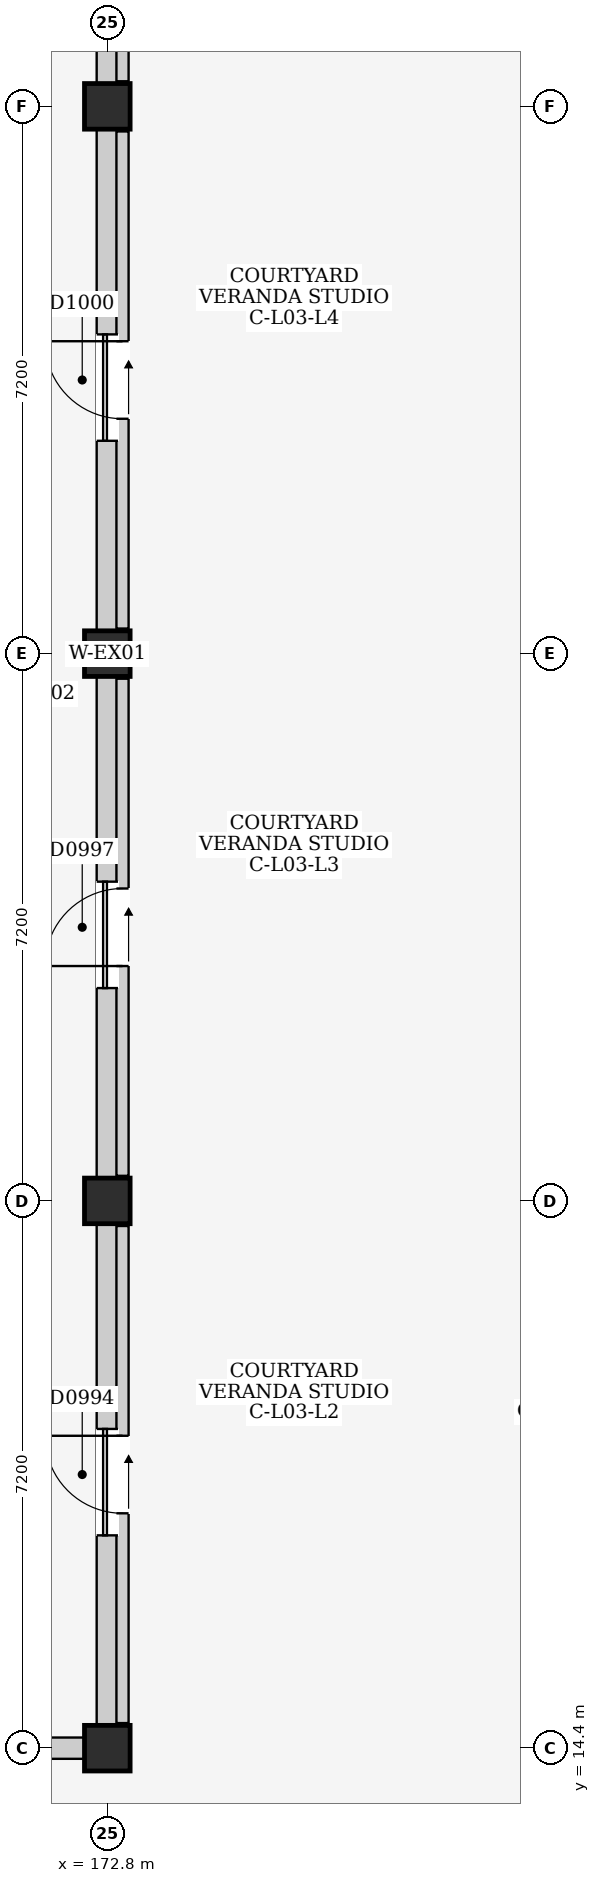
"""IFC4 building model, lengths in metres.
Left out: names, types, materials, properties, quantities, classifications, styles, units other than length and angle.
Written with IfcOpenShell. Run it as: python <this file> out.ifc"""

import sys

from ifc_helpers import new_model, si_unit, direction, frame, frame_2d, origin, origin_2d, place, context, subcontext, project, spatial, rectangle, extrude, element, fill, save


model = new_model("IFC4")
c1 = context("Model", 3, precision=1e-05, world=origin(), true_north=direction((0.0, 1.0)))
c2 = subcontext(c1, "Body", "Model", "MODEL_VIEW")
j1 = project(units=[si_unit("LENGTHUNIT", "METRE"), si_unit("PLANEANGLEUNIT", "RADIAN")], contexts=[c1])
p1 = place(None, origin())
s1 = spatial("IfcSite", under=j1, at=p1, CompositionType="ELEMENT")
p2 = place(p1, origin())
s2 = spatial("IfcBuilding", under=s1, at=p2, CompositionType="ELEMENT")
p3 = place(p2, frame((0.0, 0.0, 12.2)))
s3 = spatial("IfcBuildingStorey", under=s2, at=p3, CompositionType="ELEMENT", Elevation=12.2)
for number, where, z_axis, x_axis in (
    (1, (172.8, 14.4, 0.0), (0.0, 0.0, 1.0), (1.0, 0.0, 0.0)),
    (2, (172.8, 21.6, 0.0), (0.0, 0.0, 1.0), (1.0, 0.0, 0.0)),
    (3, (172.8, 28.8, 0.0), (0.0, 0.0, 1.0), (1.0, 0.0, 0.0)),
    (4, (172.8, 36.0, 0.0), (0.0, 0.0, 1.0), (1.0, 0.0, 0.0)),
):
    element("IfcColumn", number, at=place(p3, frame(where, z_axis=z_axis, x_axis=x_axis)), inside=s3, PredefinedType="COLUMN", context=c2, shape_type="SweptSolid", body=[
        extrude(rectangle(XDim=0.6, YDim=0.6, at=origin_2d()), origin(), (0.0, 0.0, 1.0), 3.2),
    ])
p4 = place(p3, frame((165.9, 14.4, 0.0), z_axis=(0.0, 0.0, 1.0), x_axis=(1.0, 0.0, 0.0)))
e5 = element("IfcWall", 5, at=p4, inside=s3, PredefinedType="ELEMENTEDWALL", context=c2, shape_type="SweptSolid", body=[
    extrude(rectangle(XDim=6.6, YDim=0.28, at=frame_2d((3.3, 0.0))), origin(), (0.0, 0.0, 1.0), 2.365),
])
p5 = place(p4, frame((2.8, 0.0, 1.2)))
e6 = element("IfcOpeningElement", 6, at=p5, cuts=e5, PredefinedType="OPENING", context=c2, shape_type="SweptSolid", body=[
    extrude(rectangle(XDim=1.0, YDim=0.9, at=frame_2d((0.5, 0.45))), frame((0.0, 0.155, 0.0), z_axis=(0.0, -1.0, 0.0), x_axis=(1.0, 0.0, 0.0)), (0.0, 0.0, 1.0), 0.31),
])
p6 = place(p3, frame((172.8, 14.7, 0.0), z_axis=(0.0, 0.0, 1.0), x_axis=(0.0, 1.0, 0.0)))
e7 = element("IfcWall", 7, at=p6, inside=s3, PredefinedType="ELEMENTEDWALL", context=c2, shape_type="SweptSolid", body=[
    extrude(rectangle(XDim=6.6, YDim=0.28, at=frame_2d((3.3, 0.0))), origin(), (0.0, 0.0, 1.0), 2.415),
])
p7 = place(p6, frame((2.5, 0.0, 0.0)))
e8 = element("IfcOpeningElement", 8, at=p7, cuts=e7, PredefinedType="OPENING", context=c2, shape_type="SweptSolid", body=[
    extrude(rectangle(XDim=1.4, YDim=2.1, at=frame_2d((0.7, 1.05))), frame((0.0, 0.155, 0.0), z_axis=(0.0, -1.0, 0.0), x_axis=(1.0, 0.0, 0.0)), (0.0, 0.0, 1.0), 0.31),
])
p8 = place(p3, frame((172.8, 21.9, 0.0), z_axis=(0.0, 0.0, 1.0), x_axis=(0.0, 1.0, 0.0)))
e9 = element("IfcWall", 9, at=p8, inside=s3, PredefinedType="ELEMENTEDWALL", context=c2, shape_type="SweptSolid", body=[
    extrude(rectangle(XDim=6.6, YDim=0.28, at=frame_2d((3.3, 0.0))), origin(), (0.0, 0.0, 1.0), 2.415),
])
p9 = place(p8, frame((2.5, 0.0, 0.0)))
e10 = element("IfcOpeningElement", 10, at=p9, cuts=e9, PredefinedType="OPENING", context=c2, shape_type="SweptSolid", body=[
    extrude(rectangle(XDim=1.4, YDim=2.1, at=frame_2d((0.7, 1.05))), frame((0.0, 0.155, 0.0), z_axis=(0.0, -1.0, 0.0), x_axis=(1.0, 0.0, 0.0)), (0.0, 0.0, 1.0), 0.31),
])
p10 = place(p3, frame((172.8, 29.1, 0.0), z_axis=(0.0, 0.0, 1.0), x_axis=(0.0, 1.0, 0.0)))
e11 = element("IfcWall", 11, at=p10, inside=s3, PredefinedType="ELEMENTEDWALL", context=c2, shape_type="SweptSolid", body=[
    extrude(rectangle(XDim=6.6, YDim=0.28, at=frame_2d((3.3, 0.0))), origin(), (0.0, 0.0, 1.0), 2.415),
])
p11 = place(p10, frame((2.5, 0.0, 0.0)))
e12 = element("IfcOpeningElement", 12, at=p11, cuts=e11, PredefinedType="OPENING", context=c2, shape_type="SweptSolid", body=[
    extrude(rectangle(XDim=1.4, YDim=2.1, at=frame_2d((0.7, 1.05))), frame((0.0, 0.155, 0.0), z_axis=(0.0, -1.0, 0.0), x_axis=(1.0, 0.0, 0.0)), (0.0, 0.0, 1.0), 0.31),
])
p12 = place(p3, frame((172.8, 36.3, 0.0), z_axis=(0.0, 0.0, 1.0), x_axis=(0.0, 1.0, 0.0)))
e13 = element("IfcWall", 13, at=p12, inside=s3, PredefinedType="ELEMENTEDWALL", context=c2, shape_type="SweptSolid", body=[
    extrude(rectangle(XDim=6.6, YDim=0.28, at=frame_2d((3.3, 0.0))), origin(), (0.0, 0.0, 1.0), 2.415),
])
p13 = place(p12, frame((2.5, 0.0, 0.0)))
e14 = element("IfcOpeningElement", 14, at=p13, cuts=e13, PredefinedType="OPENING", context=c2, shape_type="SweptSolid", body=[
    extrude(rectangle(XDim=1.4, YDim=2.1, at=frame_2d((0.7, 1.05))), frame((0.0, 0.155, 0.0), z_axis=(0.0, -1.0, 0.0), x_axis=(1.0, 0.0, 0.0)), (0.0, 0.0, 1.0), 0.31),
])
p14 = place(p3, frame((173.0, 14.73, 0.0), z_axis=(0.0, 0.0, 1.0), x_axis=(0.0, 1.0, 0.0)))
e15 = element("IfcWall", 15, at=p14, inside=s3, PredefinedType="PARTITIONING", context=c2, shape_type="SweptSolid", body=[
    extrude(rectangle(XDim=6.54, YDim=0.16, at=frame_2d((3.27, 0.0))), origin(), (0.0, 0.0, 1.0), 2.415),
])
p15 = place(p14, frame((2.76, 0.0, 0.0)))
e16 = element("IfcOpeningElement", 16, at=p15, cuts=e15, PredefinedType="OPENING", context=c2, shape_type="SweptSolid", body=[
    extrude(rectangle(XDim=1.02, YDim=2.18, at=frame_2d((0.51, 1.09))), frame((0.0, 0.095, 0.0), z_axis=(0.0, -1.0, 0.0), x_axis=(1.0, 0.0, 0.0)), (0.0, 0.0, 1.0), 0.19),
])
p16 = place(p3, frame((173.0, 21.93, 0.0), z_axis=(0.0, 0.0, 1.0), x_axis=(0.0, 1.0, 0.0)))
e17 = element("IfcWall", 17, at=p16, inside=s3, PredefinedType="PARTITIONING", context=c2, shape_type="SweptSolid", body=[
    extrude(rectangle(XDim=6.54, YDim=0.16, at=frame_2d((3.27, 0.0))), origin(), (0.0, 0.0, 1.0), 2.415),
])
p17 = place(p16, frame((2.76, 0.0, 0.0)))
e18 = element("IfcOpeningElement", 18, at=p17, cuts=e17, PredefinedType="OPENING", context=c2, shape_type="SweptSolid", body=[
    extrude(rectangle(XDim=1.02, YDim=2.18, at=frame_2d((0.51, 1.09))), frame((0.0, 0.095, 0.0), z_axis=(0.0, -1.0, 0.0), x_axis=(1.0, 0.0, 0.0)), (0.0, 0.0, 1.0), 0.19),
])
p18 = place(p3, frame((173.0, 29.13, 0.0), z_axis=(0.0, 0.0, 1.0), x_axis=(0.0, 1.0, 0.0)))
e19 = element("IfcWall", 19, at=p18, inside=s3, PredefinedType="PARTITIONING", context=c2, shape_type="SweptSolid", body=[
    extrude(rectangle(XDim=6.54, YDim=0.16, at=frame_2d((3.27, 0.0))), origin(), (0.0, 0.0, 1.0), 2.415),
])
p19 = place(p18, frame((2.76, 0.0, 0.0)))
e20 = element("IfcOpeningElement", 20, at=p19, cuts=e19, PredefinedType="OPENING", context=c2, shape_type="SweptSolid", body=[
    extrude(rectangle(XDim=1.02, YDim=2.18, at=frame_2d((0.51, 1.09))), frame((0.0, 0.095, 0.0), z_axis=(0.0, -1.0, 0.0), x_axis=(1.0, 0.0, 0.0)), (0.0, 0.0, 1.0), 0.19),
])
p20 = place(p3, frame((173.0, 36.33, 0.0), z_axis=(0.0, 0.0, 1.0), x_axis=(0.0, 1.0, 0.0)))
e21 = element("IfcWall", 21, at=p20, inside=s3, PredefinedType="PARTITIONING", context=c2, shape_type="SweptSolid", body=[
    extrude(rectangle(XDim=6.54, YDim=0.16, at=frame_2d((3.27, 0.0))), origin(), (0.0, 0.0, 1.0), 2.415),
])
p21 = place(p20, frame((2.76, 0.0, 0.0)))
e22 = element("IfcOpeningElement", 22, at=p21, cuts=e21, PredefinedType="OPENING", context=c2, shape_type="SweptSolid", body=[
    extrude(rectangle(XDim=1.02, YDim=2.18, at=frame_2d((0.51, 1.09))), frame((0.0, 0.095, 0.0), z_axis=(0.0, -1.0, 0.0), x_axis=(1.0, 0.0, 0.0)), (0.0, 0.0, 1.0), 0.19),
])
p22 = place(p7, frame((1.4, 0.0, 0.0), z_axis=(0.0, 0.0, 1.0), x_axis=(-1.0, 0.0, 0.0)))
e23 = element("IfcDoor", 23, at=p22, inside=s3, OperationType="SLIDING_TO_RIGHT", PredefinedType="DOOR", context=c2, shape_type="SweptSolid", body=[
    extrude(rectangle(XDim=1.4, YDim=2.1, at=frame_2d((0.7, 1.05))), frame((0.0, 0.025, 0.0), z_axis=(0.0, -1.0, 0.0), x_axis=(1.0, 0.0, 0.0)), (0.0, 0.0, 1.0), 0.05),
])
fill(e8, e23)
p23 = place(p9, frame((1.4, 0.0, 0.0), z_axis=(0.0, 0.0, 1.0), x_axis=(-1.0, 0.0, 0.0)))
e24 = element("IfcDoor", 24, at=p23, inside=s3, OperationType="SLIDING_TO_RIGHT", PredefinedType="DOOR", context=c2, shape_type="SweptSolid", body=[
    extrude(rectangle(XDim=1.4, YDim=2.1, at=frame_2d((0.7, 1.05))), frame((0.0, 0.025, 0.0), z_axis=(0.0, -1.0, 0.0), x_axis=(1.0, 0.0, 0.0)), (0.0, 0.0, 1.0), 0.05),
])
fill(e10, e24)
p24 = place(p11, frame((1.4, 0.0, 0.0), z_axis=(0.0, 0.0, 1.0), x_axis=(-1.0, 0.0, 0.0)))
e25 = element("IfcDoor", 25, at=p24, inside=s3, OperationType="SLIDING_TO_RIGHT", PredefinedType="DOOR", context=c2, shape_type="SweptSolid", body=[
    extrude(rectangle(XDim=1.4, YDim=2.1, at=frame_2d((0.7, 1.05))), frame((0.0, 0.025, 0.0), z_axis=(0.0, -1.0, 0.0), x_axis=(1.0, 0.0, 0.0)), (0.0, 0.0, 1.0), 0.05),
])
fill(e12, e25)
p25 = place(p15, origin())
e26 = element("IfcDoor", 26, at=p25, inside=s3, OperationType="SINGLE_SWING_RIGHT", PredefinedType="DOOR", context=c2, shape_type="SweptSolid", body=[
    extrude(rectangle(XDim=1.02, YDim=2.18, at=frame_2d((0.51, 1.09))), frame((0.0, 0.025, 0.0), z_axis=(0.0, -1.0, 0.0), x_axis=(1.0, 0.0, 0.0)), (0.0, 0.0, 1.0), 0.05),
])
fill(e16, e26)
p26 = place(p17, origin())
e27 = element("IfcDoor", 27, at=p26, inside=s3, OperationType="SINGLE_SWING_LEFT", PredefinedType="DOOR", context=c2, shape_type="SweptSolid", body=[
    extrude(rectangle(XDim=1.02, YDim=2.18, at=frame_2d((0.51, 1.09))), frame((0.0, 0.025, 0.0), z_axis=(0.0, -1.0, 0.0), x_axis=(1.0, 0.0, 0.0)), (0.0, 0.0, 1.0), 0.05),
])
fill(e18, e27)
p27 = place(p19, origin())
e28 = element("IfcDoor", 28, at=p27, inside=s3, OperationType="SINGLE_SWING_RIGHT", PredefinedType="DOOR", context=c2, shape_type="SweptSolid", body=[
    extrude(rectangle(XDim=1.02, YDim=2.18, at=frame_2d((0.51, 1.09))), frame((0.0, 0.025, 0.0), z_axis=(0.0, -1.0, 0.0), x_axis=(1.0, 0.0, 0.0)), (0.0, 0.0, 1.0), 0.05),
])
fill(e20, e28)
save(model, sys.argv[1])
